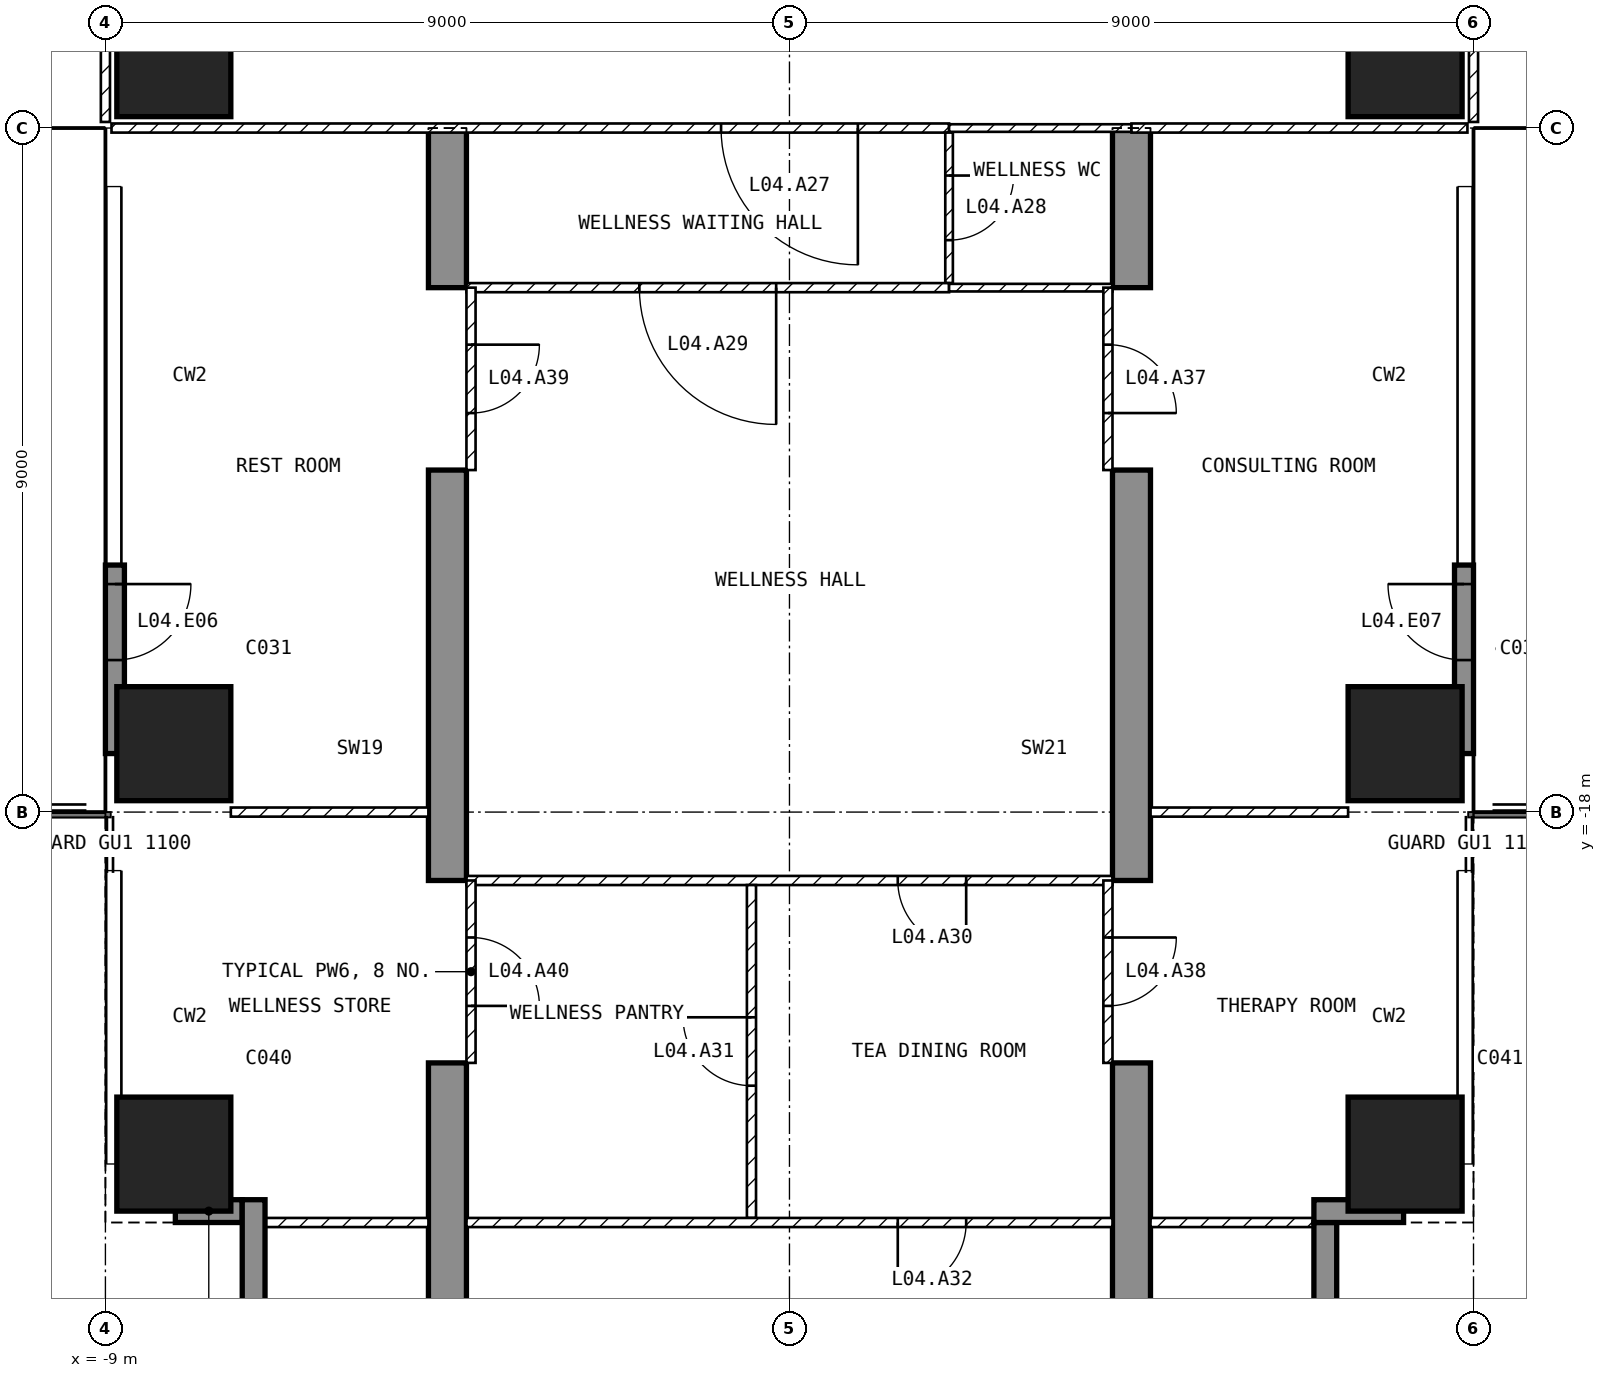
"""IFC4 building model, lengths in metres.
Left out: names, types, materials, properties, quantities, classifications, styles, units other than length and angle.
Written with IfcOpenShell. Run it as: python <this file> out.ifc"""

import sys

from ifc_helpers import new_model, si_unit, direction, frame, frame_2d, origin, origin_2d, place, context, subcontext, project, spatial, polyline, rectangle, outline, extrude, element, fill, save


model = new_model("IFC4")
c1 = context("Model", 3, precision=1e-05, world=origin(), true_north=direction((0.0, 1.0)))
c2 = subcontext(c1, "Body", "Model", "MODEL_VIEW")
j1 = project(units=[si_unit("LENGTHUNIT", "METRE"), si_unit("PLANEANGLEUNIT", "RADIAN")], contexts=[c1])
p1 = place(None, origin())
s1 = spatial("IfcSite", under=j1, at=p1, CompositionType="ELEMENT")
p2 = place(p1, origin())
s2 = spatial("IfcBuilding", under=s1, at=p2, CompositionType="ELEMENT")
p3 = place(p2, frame((0.0, 0.0, 32.0)))
s3 = spatial("IfcBuildingStorey", under=s2, at=p3, CompositionType="ELEMENT", Elevation=32.0)
for number, where, z_axis, x_axis in (
    (1, (-8.1, -22.5, -0.3), (0.0, 0.0, 1.0), (1.0, 0.0, 0.0)),
    (2, (-8.1, -17.1, -0.3), (0.0, 0.0, 1.0), (1.0, 0.0, 0.0)),
    (3, (-8.1, -8.1, -0.3), (0.0, 0.0, 1.0), (1.0, 0.0, 0.0)),
    (4, (8.1, -22.5, -0.3), (0.0, 0.0, 1.0), (1.0, 0.0, 0.0)),
    (5, (8.1, -17.1, -0.3), (0.0, 0.0, 1.0), (1.0, 0.0, 0.0)),
    (6, (8.1, -8.1, -0.3), (0.0, 0.0, 1.0), (1.0, 0.0, 0.0)),
):
    element("IfcColumn", number, at=place(p3, frame(where, z_axis=z_axis, x_axis=x_axis)), inside=s3, PredefinedType="COLUMN", context=c2, shape_type="SweptSolid", body=[
        extrude(rectangle(XDim=1.5, YDim=1.5, at=origin_2d()), origin(), (0.0, 0.0, 1.0), 4.55),
    ])
for number, where, z_axis, x_axis in (
    (7, (-4.75, -25.35, -0.3), (1.0, 0.0, 0.0), (0.0, 1.0, 0.0)),
    (8, (4.25, -25.35, -0.3), (1.0, 0.0, 0.0), (0.0, 1.0, 0.0)),
):
    element("IfcWall", number, at=place(p3, frame(where, z_axis=z_axis, x_axis=x_axis)), inside=s3, PredefinedType="SHEAR", context=c2, shape_type="SweptSolid", body=[
        extrude(outline(polyline([(0.0, 0.0), (4.05, 0.0), (4.05, 2.7), (6.45, 2.7), (6.45, 0.0), (11.85, 0.0), (11.85, 2.7), (14.25, 2.7), (14.25, 0.0), (16.35, 0.0), (16.35, 4.55), (0.0, 4.55), (0.0, 0.0)])), origin(), (0.0, 0.0, 1.0), 0.5),
    ])
p4 = place(p3, frame((-8.875, -14.75, 0.0), z_axis=(0.0, 0.0, 1.0), x_axis=(0.0, -1.0, 0.0)))
e9 = element("IfcWall", 9, at=p4, inside=s3, PredefinedType="SOLIDWALL", context=c2, shape_type="SweptSolid", body=[
    extrude(rectangle(XDim=2.48, YDim=0.25, at=frame_2d((1.24, 0.0))), origin(), (0.0, 0.0, 1.0), 4.25),
])
p5 = place(p4, frame((0.25, 0.0, 0.0)))
e10 = element("IfcOpeningElement", 10, at=p5, cuts=e9, PredefinedType="OPENING", context=c2, shape_type="SweptSolid", body=[
    extrude(rectangle(XDim=1.0, YDim=2.4, at=frame_2d((0.5, 1.2))), frame((0.0, 0.135, 0.0), z_axis=(0.0, -1.0, 0.0), x_axis=(1.0, 0.0, 0.0)), (0.0, 0.0, 1.0), 0.27),
])
p6 = place(p3, frame((8.875, -17.23, 0.0), z_axis=(0.0, 0.0, 1.0), x_axis=(0.0, 1.0, 0.0)))
e11 = element("IfcWall", 11, at=p6, inside=s3, PredefinedType="SOLIDWALL", context=c2, shape_type="SweptSolid", body=[
    extrude(rectangle(XDim=2.48, YDim=0.25, at=frame_2d((1.24, 0.0))), origin(), (0.0, 0.0, 1.0), 4.25),
])
p7 = place(p6, frame((1.23, 0.0, 0.0)))
e12 = element("IfcOpeningElement", 12, at=p7, cuts=e11, PredefinedType="OPENING", context=c2, shape_type="SweptSolid", body=[
    extrude(rectangle(XDim=1.0, YDim=2.4, at=frame_2d((0.5, 1.2))), frame((0.0, 0.135, 0.0), z_axis=(0.0, -1.0, 0.0), x_axis=(1.0, 0.0, 0.0)), (0.0, 0.0, 1.0), 0.27),
])
p8 = place(p3, frame((7.05, -25.2, 0.0), z_axis=(0.0, 0.0, 1.0), x_axis=(0.0, 1.0, 0.0)))
e13 = element("IfcWall", 13, at=p8, inside=s3, PredefinedType="SOLIDWALL", context=c2, shape_type="SweptSolid", body=[
    extrude(rectangle(XDim=1.8, YDim=0.3, at=frame_2d((0.9, 0.0))), origin(), (0.0, 0.0, 1.0), 4.25),
])
p9 = place(p3, frame((6.9, -23.25, 0.0), z_axis=(0.0, 0.0, 1.0), x_axis=(1.0, 0.0, 0.0)))
e14 = element("IfcWall", 14, at=p9, inside=s3, PredefinedType="SOLIDWALL", context=c2, shape_type="SweptSolid", body=[
    extrude(rectangle(XDim=1.18, YDim=0.3, at=frame_2d((0.59, 0.0))), origin(), (0.0, 0.0, 1.0), 4.25),
])
p10 = place(p3, frame((-8.08, -23.25, 0.0), z_axis=(0.0, 0.0, 1.0), x_axis=(1.0, 0.0, 0.0)))
e15 = element("IfcWall", 15, at=p10, inside=s3, PredefinedType="SOLIDWALL", context=c2, shape_type="SweptSolid", body=[
    extrude(rectangle(XDim=0.88, YDim=0.3, at=frame_2d((0.44, 0.0))), origin(), (0.0, 0.0, 1.0), 4.25),
])
p11 = place(p3, frame((-7.05, -23.1, 0.0), z_axis=(0.0, 0.0, 1.0), x_axis=(0.0, -1.0, 0.0)))
e16 = element("IfcWall", 16, at=p11, inside=s3, PredefinedType="SOLIDWALL", context=c2, shape_type="SweptSolid", body=[
    extrude(rectangle(XDim=1.8, YDim=0.3, at=frame_2d((0.9, 0.0))), origin(), (0.0, 0.0, 1.0), 4.25),
])
for number, where, z_axis, x_axis in (
    (17, (9.0, -1.26, 0.0), (0.0, 0.0, 1.0), (0.0, -1.0, 0.0)),
    (18, (-9.0, -8.92, 0.0), (0.0, 0.0, 1.0), (0.0, 1.0, 0.0)),
):
    element("IfcWall", number, at=place(p3, frame(where, z_axis=z_axis, x_axis=x_axis)), inside=s3, PredefinedType="PARTITIONING", context=c2, shape_type="SweptSolid", body=[
        extrude(rectangle(XDim=7.66, YDim=0.12, at=frame_2d((3.83, 0.0))), origin(), (0.0, 0.0, 1.0), 4.25),
    ])
p12 = place(p3, frame((2.1, -9.0, 0.0), z_axis=(0.0, 0.0, 1.0), x_axis=(-1.0, 0.0, 0.0)))
e19 = element("IfcWall", 19, at=p12, inside=s3, PredefinedType="PARTITIONING", context=c2, shape_type="SweptSolid", body=[
    extrude(rectangle(XDim=11.02, YDim=0.12, at=frame_2d((5.51, 0.0))), origin(), (0.0, 0.0, 1.0), 4.25),
])
p13 = place(p12, frame((1.2, 0.0, 0.0)))
e20 = element("IfcOpeningElement", 20, at=p13, cuts=e19, PredefinedType="OPENING", context=c2, shape_type="SweptSolid", body=[
    extrude(rectangle(XDim=1.8, YDim=2.1, at=frame_2d((0.9, 1.05))), frame((0.0, 0.07, 0.0), z_axis=(0.0, -1.0, 0.0), x_axis=(1.0, 0.0, 0.0)), (0.0, 0.0, 1.0), 0.14),
])
p14 = place(p3, frame((4.5, -9.0, 0.0), z_axis=(0.0, 0.0, 1.0), x_axis=(-1.0, 0.0, 0.0)))
e21 = element("IfcWall", 21, at=p14, inside=s3, PredefinedType="PARTITIONING", context=c2, shape_type="SweptSolid", body=[
    extrude(rectangle(XDim=2.4, YDim=0.1, at=frame_2d((1.2, 0.0))), origin(), (0.0, 0.0, 1.0), 4.25),
])
p15 = place(p3, frame((8.92, -9.0, 0.0), z_axis=(0.0, 0.0, 1.0), x_axis=(-1.0, 0.0, 0.0)))
e22 = element("IfcWall", 22, at=p15, inside=s3, PredefinedType="PARTITIONING", context=c2, shape_type="SweptSolid", body=[
    extrude(rectangle(XDim=4.42, YDim=0.12, at=frame_2d((2.21, 0.0))), origin(), (0.0, 0.0, 1.0), 4.25),
])
p16 = place(p3, frame((2.1, -9.06, 0.0), z_axis=(0.0, 0.0, 1.0), x_axis=(0.0, -1.0, 0.0)))
e23 = element("IfcWall", 23, at=p16, inside=s3, PredefinedType="PARTITIONING", context=c2, shape_type="SweptSolid", body=[
    extrude(rectangle(XDim=1.98, YDim=0.1, at=frame_2d((0.99, 0.0))), origin(), (0.0, 0.0, 1.0), 4.25),
])
p17 = place(p16, frame((0.565, 0.0, 0.0)))
e24 = element("IfcOpeningElement", 24, at=p17, cuts=e23, PredefinedType="OPENING", context=c2, shape_type="SweptSolid", body=[
    extrude(rectangle(XDim=0.85, YDim=2.1, at=frame_2d((0.425, 1.05))), frame((0.0, 0.06, 0.0), z_axis=(0.0, -1.0, 0.0), x_axis=(1.0, 0.0, 0.0)), (0.0, 0.0, 1.0), 0.12),
])
p18 = place(p3, frame((2.1, -11.1, 0.0), z_axis=(0.0, 0.0, 1.0), x_axis=(-1.0, 0.0, 0.0)))
e25 = element("IfcWall", 25, at=p18, inside=s3, PredefinedType="PARTITIONING", context=c2, shape_type="SweptSolid", body=[
    extrude(rectangle(XDim=6.35, YDim=0.12, at=frame_2d((3.175, 0.0))), origin(), (0.0, 0.0, 1.0), 4.25),
])
p19 = place(p18, frame((2.275, 0.0, 0.0)))
e26 = element("IfcOpeningElement", 26, at=p19, cuts=e25, PredefinedType="OPENING", context=c2, shape_type="SweptSolid", body=[
    extrude(rectangle(XDim=1.8, YDim=2.1, at=frame_2d((0.9, 1.05))), frame((0.0, 0.07, 0.0), z_axis=(0.0, -1.0, 0.0), x_axis=(1.0, 0.0, 0.0)), (0.0, 0.0, 1.0), 0.14),
])
p20 = place(p3, frame((4.25, -11.1, 0.0), z_axis=(0.0, 0.0, 1.0), x_axis=(-1.0, 0.0, 0.0)))
e27 = element("IfcWall", 27, at=p20, inside=s3, PredefinedType="PARTITIONING", context=c2, shape_type="SweptSolid", body=[
    extrude(rectangle(XDim=2.15, YDim=0.1, at=frame_2d((1.075, 0.0))), origin(), (0.0, 0.0, 1.0), 4.25),
])
p21 = place(p3, frame((4.25, -18.9, 0.0), z_axis=(0.0, 0.0, 1.0), x_axis=(-1.0, 0.0, 0.0)))
e28 = element("IfcWall", 28, at=p21, inside=s3, PredefinedType="PARTITIONING", context=c2, shape_type="SweptSolid", body=[
    extrude(rectangle(XDim=8.5, YDim=0.12, at=frame_2d((4.25, 0.0))), origin(), (0.0, 0.0, 1.0), 4.25),
])
p22 = place(p21, frame((1.925, 0.0, 0.0)))
e29 = element("IfcOpeningElement", 29, at=p22, cuts=e28, PredefinedType="OPENING", context=c2, shape_type="SweptSolid", body=[
    extrude(rectangle(XDim=0.9, YDim=2.1, at=frame_2d((0.45, 1.05))), frame((0.0, 0.07, 0.0), z_axis=(0.0, -1.0, 0.0), x_axis=(1.0, 0.0, 0.0)), (0.0, 0.0, 1.0), 0.14),
])
p23 = place(p3, frame((-0.5, -23.34, 0.0), z_axis=(0.0, 0.0, 1.0), x_axis=(0.0, 1.0, 0.0)))
e30 = element("IfcWall", 30, at=p23, inside=s3, PredefinedType="PARTITIONING", context=c2, shape_type="SweptSolid", body=[
    extrude(rectangle(XDim=4.38, YDim=0.12, at=frame_2d((2.19, 0.0))), origin(), (0.0, 0.0, 1.0), 4.25),
])
p24 = place(p23, frame((1.74, 0.0, 0.0)))
e31 = element("IfcOpeningElement", 31, at=p24, cuts=e30, PredefinedType="OPENING", context=c2, shape_type="SweptSolid", body=[
    extrude(rectangle(XDim=0.9, YDim=2.1, at=frame_2d((0.45, 1.05))), frame((0.0, 0.07, 0.0), z_axis=(0.0, -1.0, 0.0), x_axis=(1.0, 0.0, 0.0)), (0.0, 0.0, 1.0), 0.14),
])
p25 = place(p3, frame((4.25, -23.4, 0.0), z_axis=(0.0, 0.0, 1.0), x_axis=(-1.0, 0.0, 0.0)))
e32 = element("IfcWall", 32, at=p25, inside=s3, PredefinedType="PARTITIONING", context=c2, shape_type="SweptSolid", body=[
    extrude(rectangle(XDim=8.5, YDim=0.12, at=frame_2d((4.25, 0.0))), origin(), (0.0, 0.0, 1.0), 4.25),
])
p26 = place(p25, frame((1.925, 0.0, 0.0)))
e33 = element("IfcOpeningElement", 33, at=p26, cuts=e32, PredefinedType="OPENING", context=c2, shape_type="SweptSolid", body=[
    extrude(rectangle(XDim=0.9, YDim=2.1, at=frame_2d((0.45, 1.05))), frame((0.0, 0.07, 0.0), z_axis=(0.0, -1.0, 0.0), x_axis=(1.0, 0.0, 0.0)), (0.0, 0.0, 1.0), 0.14),
])
p27 = place(p3, frame((7.35, -18.0, 0.0), z_axis=(0.0, 0.0, 1.0), x_axis=(-1.0, 0.0, 0.0)))
e34 = element("IfcWall", 34, at=p27, inside=s3, PredefinedType="PARTITIONING", context=c2, shape_type="SweptSolid", body=[
    extrude(rectangle(XDim=2.6, YDim=0.12, at=frame_2d((1.3, 0.0))), origin(), (0.0, 0.0, 1.0), 4.25),
])
p28 = place(p3, frame((7.12, -23.4, 0.0), z_axis=(0.0, 0.0, 1.0), x_axis=(-1.0, 0.0, 0.0)))
e35 = element("IfcWall", 35, at=p28, inside=s3, PredefinedType="PARTITIONING", context=c2, shape_type="SweptSolid", body=[
    extrude(rectangle(XDim=2.37, YDim=0.12, at=frame_2d((1.185, 0.0))), origin(), (0.0, 0.0, 1.0), 4.25),
])
p29 = place(p3, frame((-4.75, -18.0, 0.0), z_axis=(0.0, 0.0, 1.0), x_axis=(-1.0, 0.0, 0.0)))
e36 = element("IfcWall", 36, at=p29, inside=s3, PredefinedType="PARTITIONING", context=c2, shape_type="SweptSolid", body=[
    extrude(rectangle(XDim=2.6, YDim=0.12, at=frame_2d((1.3, 0.0))), origin(), (0.0, 0.0, 1.0), 4.25),
])
p30 = place(p3, frame((-4.75, -23.4, 0.0), z_axis=(0.0, 0.0, 1.0), x_axis=(-1.0, 0.0, 0.0)))
e37 = element("IfcWall", 37, at=p30, inside=s3, PredefinedType="PARTITIONING", context=c2, shape_type="SweptSolid", body=[
    extrude(rectangle(XDim=2.37, YDim=0.12, at=frame_2d((1.185, 0.0))), origin(), (0.0, 0.0, 1.0), 4.25),
])
p31 = place(p3, frame((4.19, -11.1, 0.0), z_axis=(0.0, 0.0, 1.0), x_axis=(0.0, -1.0, 0.0)))
e38 = element("IfcWall", 38, at=p31, inside=s3, PredefinedType="PARTITIONING", context=c2, shape_type="SweptSolid", body=[
    extrude(rectangle(XDim=2.4, YDim=0.12, at=frame_2d((1.2, 0.0))), origin(), (0.0, 0.0, 1.0), 2.4),
])
p32 = place(p31, frame((0.75, 0.0, 0.0)))
e39 = element("IfcOpeningElement", 39, at=p32, cuts=e38, PredefinedType="OPENING", context=c2, shape_type="SweptSolid", body=[
    extrude(rectangle(XDim=0.9, YDim=2.1, at=frame_2d((0.45, 1.05))), frame((0.0, 0.07, 0.0), z_axis=(0.0, -1.0, 0.0), x_axis=(1.0, 0.0, 0.0)), (0.0, 0.0, 1.0), 0.14),
])
p33 = place(p3, frame((4.19, -18.9, 0.0), z_axis=(0.0, 0.0, 1.0), x_axis=(0.0, -1.0, 0.0)))
e40 = element("IfcWall", 40, at=p33, inside=s3, PredefinedType="PARTITIONING", context=c2, shape_type="SweptSolid", body=[
    extrude(rectangle(XDim=2.4, YDim=0.12, at=frame_2d((1.2, 0.0))), origin(), (0.0, 0.0, 1.0), 2.4),
])
p34 = place(p33, frame((0.75, 0.0, 0.0)))
e41 = element("IfcOpeningElement", 41, at=p34, cuts=e40, PredefinedType="OPENING", context=c2, shape_type="SweptSolid", body=[
    extrude(rectangle(XDim=0.9, YDim=2.1, at=frame_2d((0.45, 1.05))), frame((0.0, 0.07, 0.0), z_axis=(0.0, -1.0, 0.0), x_axis=(1.0, 0.0, 0.0)), (0.0, 0.0, 1.0), 0.14),
])
p35 = place(p3, frame((-4.19, -11.1, 0.0), z_axis=(0.0, 0.0, 1.0), x_axis=(0.0, -1.0, 0.0)))
e42 = element("IfcWall", 42, at=p35, inside=s3, PredefinedType="PARTITIONING", context=c2, shape_type="SweptSolid", body=[
    extrude(rectangle(XDim=2.4, YDim=0.12, at=frame_2d((1.2, 0.0))), origin(), (0.0, 0.0, 1.0), 2.4),
])
p36 = place(p35, frame((0.75, 0.0, 0.0)))
e43 = element("IfcOpeningElement", 43, at=p36, cuts=e42, PredefinedType="OPENING", context=c2, shape_type="SweptSolid", body=[
    extrude(rectangle(XDim=0.9, YDim=2.1, at=frame_2d((0.45, 1.05))), frame((0.0, 0.07, 0.0), z_axis=(0.0, -1.0, 0.0), x_axis=(1.0, 0.0, 0.0)), (0.0, 0.0, 1.0), 0.14),
])
p37 = place(p3, frame((-4.19, -18.9, 0.0), z_axis=(0.0, 0.0, 1.0), x_axis=(0.0, -1.0, 0.0)))
e44 = element("IfcWall", 44, at=p37, inside=s3, PredefinedType="PARTITIONING", context=c2, shape_type="SweptSolid", body=[
    extrude(rectangle(XDim=2.4, YDim=0.12, at=frame_2d((1.2, 0.0))), origin(), (0.0, 0.0, 1.0), 2.4),
])
p38 = place(p37, frame((0.75, 0.0, 0.0)))
e45 = element("IfcOpeningElement", 45, at=p38, cuts=e44, PredefinedType="OPENING", context=c2, shape_type="SweptSolid", body=[
    extrude(rectangle(XDim=0.9, YDim=2.1, at=frame_2d((0.45, 1.05))), frame((0.0, 0.07, 0.0), z_axis=(0.0, -1.0, 0.0), x_axis=(1.0, 0.0, 0.0)), (0.0, 0.0, 1.0), 0.14),
])
p39 = place(p5, origin())
e46 = element("IfcDoor", 46, at=p39, inside=s3, OperationType="SINGLE_SWING_LEFT", PredefinedType="DOOR", context=c2, shape_type="SweptSolid", body=[
    extrude(rectangle(XDim=1.0, YDim=2.4, at=frame_2d((0.5, 1.2))), frame((0.0, 0.025, 0.0), z_axis=(0.0, -1.0, 0.0), x_axis=(1.0, 0.0, 0.0)), (0.0, 0.0, 1.0), 0.05),
])
fill(e10, e46)
p40 = place(p7, origin())
e47 = element("IfcDoor", 47, at=p40, inside=s3, OperationType="SINGLE_SWING_RIGHT", PredefinedType="DOOR", context=c2, shape_type="SweptSolid", body=[
    extrude(rectangle(XDim=1.0, YDim=2.4, at=frame_2d((0.5, 1.2))), frame((0.0, 0.025, 0.0), z_axis=(0.0, -1.0, 0.0), x_axis=(1.0, 0.0, 0.0)), (0.0, 0.0, 1.0), 0.05),
])
fill(e12, e47)
p41 = place(p13, origin())
e48 = element("IfcDoor", 48, at=p41, inside=s3, OperationType="SINGLE_SWING_LEFT", PredefinedType="DOOR", context=c2, shape_type="SweptSolid", body=[
    extrude(rectangle(XDim=1.8, YDim=2.1, at=frame_2d((0.9, 1.05))), frame((0.0, 0.025, 0.0), z_axis=(0.0, -1.0, 0.0), x_axis=(1.0, 0.0, 0.0)), (0.0, 0.0, 1.0), 0.05),
])
fill(e20, e48)
p42 = place(p17, origin())
e49 = element("IfcDoor", 49, at=p42, inside=s3, OperationType="SINGLE_SWING_LEFT", PredefinedType="DOOR", context=c2, shape_type="SweptSolid", body=[
    extrude(rectangle(XDim=0.85, YDim=2.1, at=frame_2d((0.425, 1.05))), frame((0.0, 0.025, 0.0), z_axis=(0.0, -1.0, 0.0), x_axis=(1.0, 0.0, 0.0)), (0.0, 0.0, 1.0), 0.05),
])
fill(e24, e49)
p43 = place(p19, origin())
e50 = element("IfcDoor", 50, at=p43, inside=s3, OperationType="SINGLE_SWING_LEFT", PredefinedType="DOOR", context=c2, shape_type="SweptSolid", body=[
    extrude(rectangle(XDim=1.8, YDim=2.1, at=frame_2d((0.9, 1.05))), frame((0.0, 0.025, 0.0), z_axis=(0.0, -1.0, 0.0), x_axis=(1.0, 0.0, 0.0)), (0.0, 0.0, 1.0), 0.05),
])
fill(e26, e50)
p44 = place(p22, origin())
e51 = element("IfcDoor", 51, at=p44, inside=s3, OperationType="SINGLE_SWING_LEFT", PredefinedType="DOOR", context=c2, shape_type="SweptSolid", body=[
    extrude(rectangle(XDim=0.9, YDim=2.1, at=frame_2d((0.45, 1.05))), frame((0.0, 0.025, 0.0), z_axis=(0.0, -1.0, 0.0), x_axis=(1.0, 0.0, 0.0)), (0.0, 0.0, 1.0), 0.05),
])
fill(e29, e51)
p45 = place(p24, origin())
e52 = element("IfcDoor", 52, at=p45, inside=s3, OperationType="SINGLE_SWING_RIGHT", PredefinedType="DOOR", context=c2, shape_type="SweptSolid", body=[
    extrude(rectangle(XDim=0.9, YDim=2.1, at=frame_2d((0.45, 1.05))), frame((0.0, 0.025, 0.0), z_axis=(0.0, -1.0, 0.0), x_axis=(1.0, 0.0, 0.0)), (0.0, 0.0, 1.0), 0.05),
])
fill(e31, e52)
p46 = place(p26, origin())
e53 = element("IfcDoor", 53, at=p46, inside=s3, OperationType="SINGLE_SWING_RIGHT", PredefinedType="DOOR", context=c2, shape_type="SweptSolid", body=[
    extrude(rectangle(XDim=0.9, YDim=2.1, at=frame_2d((0.45, 1.05))), frame((0.0, 0.025, 0.0), z_axis=(0.0, -1.0, 0.0), x_axis=(1.0, 0.0, 0.0)), (0.0, 0.0, 1.0), 0.05),
])
fill(e33, e53)
p47 = place(p32, origin())
e54 = element("IfcDoor", 54, at=p47, inside=s3, OperationType="SINGLE_SWING_RIGHT", PredefinedType="DOOR", context=c2, shape_type="SweptSolid", body=[
    extrude(rectangle(XDim=0.9, YDim=2.1, at=frame_2d((0.45, 1.05))), frame((0.0, 0.025, 0.0), z_axis=(0.0, -1.0, 0.0), x_axis=(1.0, 0.0, 0.0)), (0.0, 0.0, 1.0), 0.05),
])
fill(e39, e54)
p48 = place(p34, origin())
e55 = element("IfcDoor", 55, at=p48, inside=s3, OperationType="SINGLE_SWING_LEFT", PredefinedType="DOOR", context=c2, shape_type="SweptSolid", body=[
    extrude(rectangle(XDim=0.9, YDim=2.1, at=frame_2d((0.45, 1.05))), frame((0.0, 0.025, 0.0), z_axis=(0.0, -1.0, 0.0), x_axis=(1.0, 0.0, 0.0)), (0.0, 0.0, 1.0), 0.05),
])
fill(e41, e55)
p49 = place(p36, origin())
e56 = element("IfcDoor", 56, at=p49, inside=s3, OperationType="SINGLE_SWING_LEFT", PredefinedType="DOOR", context=c2, shape_type="SweptSolid", body=[
    extrude(rectangle(XDim=0.9, YDim=2.1, at=frame_2d((0.45, 1.05))), frame((0.0, 0.025, 0.0), z_axis=(0.0, -1.0, 0.0), x_axis=(1.0, 0.0, 0.0)), (0.0, 0.0, 1.0), 0.05),
])
fill(e43, e56)
p50 = place(p38, origin())
e57 = element("IfcDoor", 57, at=p50, inside=s3, OperationType="SINGLE_SWING_RIGHT", PredefinedType="DOOR", context=c2, shape_type="SweptSolid", body=[
    extrude(rectangle(XDim=0.9, YDim=2.1, at=frame_2d((0.45, 1.05))), frame((0.0, 0.025, 0.0), z_axis=(0.0, -1.0, 0.0), x_axis=(1.0, 0.0, 0.0)), (0.0, 0.0, 1.0), 0.05),
])
fill(e45, e57)
save(model, sys.argv[1])
